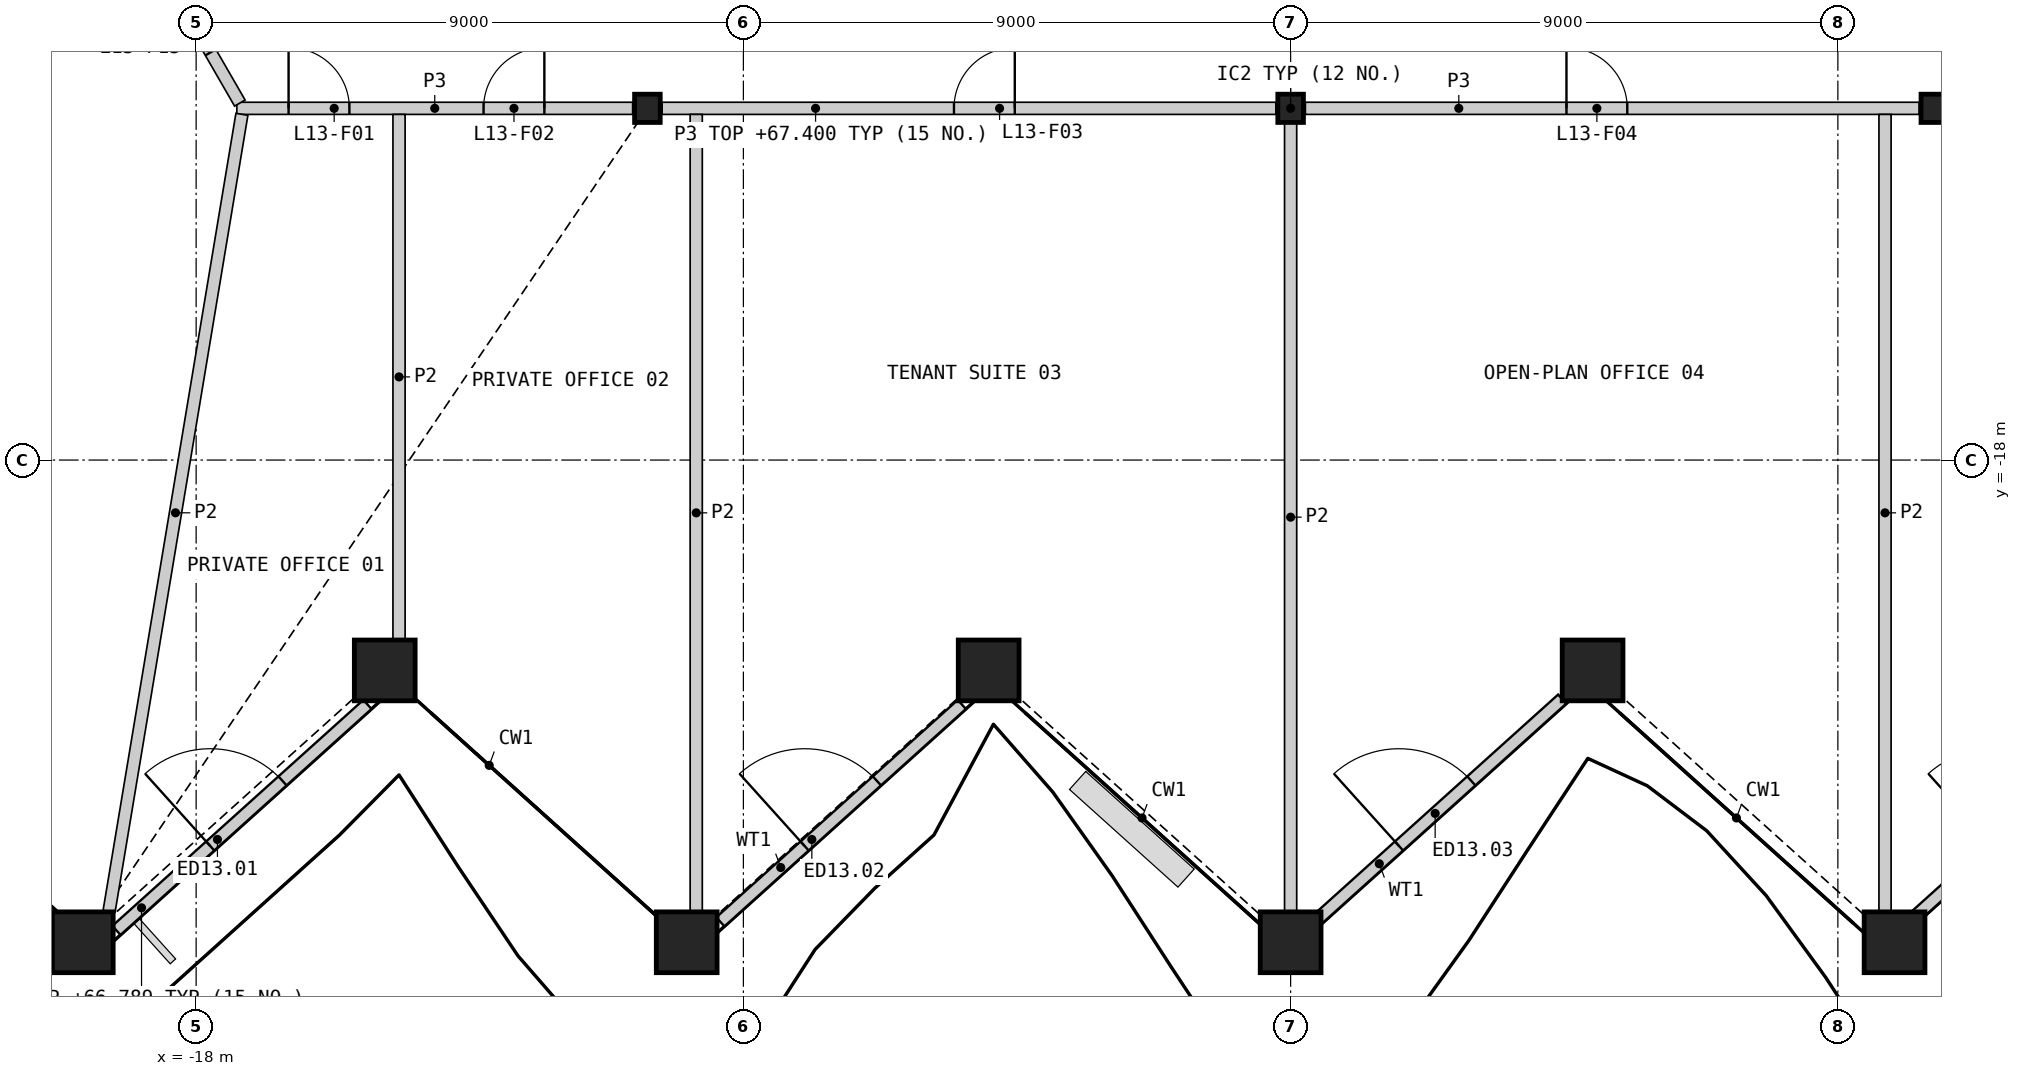
"""IFC4 building model, lengths in metres.
Left out: names, types, materials, properties, quantities, classifications, styles, units other than length and angle.
Written with IfcOpenShell. Run it as: python <this file> out.ifc"""

import sys

from ifc_helpers import new_model, si_unit, direction, frame, frame_2d, origin, origin_2d, place, context, subcontext, project, spatial, rectangle, hollow_rectangle, i_section, extrude, element, fill, save


model = new_model("IFC4")
c1 = context("Model", 3, precision=1e-05, world=origin(), true_north=direction((0.0, 1.0)))
c2 = subcontext(c1, "Body", "Model", "MODEL_VIEW")
j1 = project(units=[si_unit("LENGTHUNIT", "METRE"), si_unit("PLANEANGLEUNIT", "RADIAN")], contexts=[c1])
p1 = place(None, origin())
s1 = spatial("IfcSite", under=j1, at=p1, CompositionType="ELEMENT")
p2 = place(p1, origin())
s2 = spatial("IfcBuilding", under=s1, at=p2, CompositionType="ELEMENT")
p3 = place(p2, frame((0.0, 0.0, 63.6)))
s3 = spatial("IfcBuildingStorey", under=s2, at=p3, CompositionType="ELEMENT", Elevation=63.6)
for number, where, z_axis, x_axis in (
    (1, (-19.864, -25.931, 0.0), (0.0, 0.0, 1.0), (1.0, 0.0, 0.0)),
    (2, (-14.898, -21.46, 0.0), (0.0, 0.0, 1.0), (1.0, 0.0, 0.0)),
    (3, (-9.932, -25.931, 0.0), (0.0, 0.0, 1.0), (1.0, 0.0, 0.0)),
    (4, (-4.966, -21.46, 0.0), (0.0, 0.0, 1.0), (1.0, 0.0, 0.0)),
    (5, (0.0, -25.931, 0.0), (0.0, 0.0, 1.0), (1.0, 0.0, 0.0)),
    (6, (4.966, -21.46, 0.0), (0.0, 0.0, 1.0), (1.0, 0.0, 0.0)),
    (7, (9.932, -25.931, 0.0), (0.0, 0.0, 1.0), (1.0, 0.0, 0.0)),
):
    element("IfcColumn", number, at=place(p3, frame(where, z_axis=z_axis, x_axis=x_axis)), inside=s3, PredefinedType="COLUMN", context=c2, shape_type="SweptSolid", body=[
        extrude(hollow_rectangle(XDim=1.0, YDim=1.0, WallThickness=0.07, at=origin_2d()), origin(), (0.0, 0.0, 1.0), 4.2),
    ])
for number, where, z_axis, x_axis in (
    (8, (-10.578, -12.215, 0.0), (0.0, 0.0, 1.0), (1.0, 0.0, 0.0)),
    (9, (0.0, -12.215, 0.0), (0.0, 0.0, 1.0), (1.0, 0.0, 0.0)),
    (10, (10.578, -12.215, 0.0), (0.0, 0.0, 1.0), (1.0, 0.0, 0.0)),
):
    element("IfcColumn", number, at=place(p3, frame(where, z_axis=z_axis, x_axis=x_axis)), inside=s3, PredefinedType="COLUMN", context=c2, shape_type="SweptSolid", body=[
        extrude(i_section(OverallWidth=0.421, OverallDepth=0.465, WebThickness=0.045, FlangeThickness=0.072, at=origin_2d()), origin(), (0.0, 0.0, 1.0), 4.2),
    ])
p4 = place(p3, frame((-19.311, -25.736, 0.0), z_axis=(0.0, 0.0, 1.0), x_axis=(0.743147692621, 0.66912742206, 0.0)))
e11 = element("IfcWall", 11, at=p4, inside=s3, PredefinedType="SOLIDWALL", context=c2, shape_type="SweptSolid", body=[
    extrude(rectangle(XDim=5.554, YDim=0.2, at=frame_2d((2.777, 0.0))), origin(), (0.0, 0.0, 1.0), 3.189),
])
p5 = place(p4, frame((2.075, 0.0, 0.0)))
e12 = element("IfcOpeningElement", 12, at=p5, cuts=e11, PredefinedType="OPENING", context=c2, shape_type="SweptSolid", body=[
    extrude(rectangle(XDim=1.6, YDim=2.4, at=frame_2d((0.8, 1.2))), frame((0.0, 0.11, 0.0), z_axis=(0.0, -1.0, 0.0), x_axis=(1.0, 0.0, 0.0)), (0.0, 0.0, 1.0), 0.22),
])
p6 = place(p3, frame((-9.379, -25.595, 0.0), z_axis=(0.0, 0.0, 1.0), x_axis=(0.743144193556, 0.669131308178, 0.0)))
e13 = element("IfcWall", 13, at=p6, inside=s3, PredefinedType="SOLIDWALL", context=c2, shape_type="SweptSolid", body=[
    extrude(rectangle(XDim=5.344, YDim=0.2, at=frame_2d((2.672, 0.0))), origin(), (0.0, 0.0, 1.0), 3.189),
])
p7 = place(p6, frame((1.865, 0.0, 0.0)))
e14 = element("IfcOpeningElement", 14, at=p7, cuts=e13, PredefinedType="OPENING", context=c2, shape_type="SweptSolid", body=[
    extrude(rectangle(XDim=1.6, YDim=2.4, at=frame_2d((0.8, 1.2))), frame((0.0, 0.11, 0.0), z_axis=(0.0, -1.0, 0.0), x_axis=(1.0, 0.0, 0.0)), (0.0, 0.0, 1.0), 0.22),
])
p8 = place(p3, frame((0.456, -25.542, 0.0), z_axis=(0.0, 0.0, 1.0), x_axis=(0.743143413551, 0.669132174459, 0.0)))
e15 = element("IfcWall", 15, at=p8, inside=s3, PredefinedType="SOLIDWALL", context=c2, shape_type="SweptSolid", body=[
    extrude(rectangle(XDim=5.397, YDim=0.2, at=frame_2d((2.698, 0.0))), origin(), (0.0, 0.0, 1.0), 3.189),
])
p9 = place(p8, frame((1.786, 0.0, 0.0)))
e16 = element("IfcOpeningElement", 16, at=p9, cuts=e15, PredefinedType="OPENING", context=c2, shape_type="SweptSolid", body=[
    extrude(rectangle(XDim=1.6, YDim=2.4, at=frame_2d((0.8, 1.2))), frame((0.0, 0.11, 0.0), z_axis=(0.0, -1.0, 0.0), x_axis=(1.0, 0.0, 0.0)), (0.0, 0.0, 1.0), 0.22),
])
p10 = place(p3, frame((10.231, -25.542, 0.0), z_axis=(0.0, 0.0, 1.0), x_axis=(0.743162549077, 0.669110921783, 0.0)))
e17 = element("IfcWall", 17, at=p10, inside=s3, PredefinedType="SOLIDWALL", context=c2, shape_type="SweptSolid", body=[
    extrude(rectangle(XDim=5.535, YDim=0.2, at=frame_2d((2.768, 0.0))), origin(), (0.0, 0.0, 1.0), 3.189),
])
p11 = place(p10, frame((1.786, 0.0, 0.0)))
e18 = element("IfcOpeningElement", 18, at=p11, cuts=e17, PredefinedType="OPENING", context=c2, shape_type="SweptSolid", body=[
    extrude(rectangle(XDim=1.6, YDim=2.4, at=frame_2d((0.8, 1.2))), frame((0.0, 0.11, 0.0), z_axis=(0.0, -1.0, 0.0), x_axis=(1.0, 0.0, 0.0)), (0.0, 0.0, 1.0), 0.22),
])
p12 = place(p3, frame((-10.336, -12.215, 0.0), z_axis=(0.0, 0.0, 1.0), x_axis=(1.0, 0.0, 0.0)))
e19 = element("IfcWall", 19, at=p12, inside=s3, PredefinedType="PARTITIONING", context=c2, shape_type="SweptSolid", body=[
    extrude(rectangle(XDim=10.094, YDim=0.2, at=frame_2d((5.047, 0.0))), origin(), (0.0, 0.0, 1.0), 3.8),
])
p13 = place(p12, frame((4.8, 0.0, 0.0)))
e20 = element("IfcOpeningElement", 20, at=p13, cuts=e19, PredefinedType="OPENING", context=c2, shape_type="SweptSolid", body=[
    extrude(rectangle(XDim=1.0, YDim=2.1, at=frame_2d((0.5, 1.05))), frame((0.0, 0.11, 0.0), z_axis=(0.0, -1.0, 0.0), x_axis=(1.0, 0.0, 0.0)), (0.0, 0.0, 1.0), 0.22),
])
p14 = place(p3, frame((0.242, -12.215, 0.0), z_axis=(0.0, 0.0, 1.0), x_axis=(1.0, 0.0, 0.0)))
e21 = element("IfcWall", 21, at=p14, inside=s3, PredefinedType="PARTITIONING", context=c2, shape_type="SweptSolid", body=[
    extrude(rectangle(XDim=10.094, YDim=0.2, at=frame_2d((5.047, 0.0))), origin(), (0.0, 0.0, 1.0), 3.8),
])
p15 = place(p14, frame((4.294, 0.0, 0.0)))
e22 = element("IfcOpeningElement", 22, at=p15, cuts=e21, PredefinedType="OPENING", context=c2, shape_type="SweptSolid", body=[
    extrude(rectangle(XDim=1.0, YDim=2.1, at=frame_2d((0.5, 1.05))), frame((0.0, 0.11, 0.0), z_axis=(0.0, -1.0, 0.0), x_axis=(1.0, 0.0, 0.0)), (0.0, 0.0, 1.0), 0.22),
])
p16 = place(p3, frame((-17.331, -12.215, 0.0), z_axis=(0.0, 0.0, 1.0), x_axis=(1.0, 0.0, 0.0)))
e23 = element("IfcWall", 23, at=p16, inside=s3, PredefinedType="PARTITIONING", context=c2, shape_type="SweptSolid", body=[
    extrude(rectangle(XDim=6.51, YDim=0.2, at=frame_2d((3.255, 0.0))), origin(), (0.0, 0.0, 1.0), 3.8),
])
p17 = place(p16, frame((0.851, 0.0, 0.0)))
e24 = element("IfcOpeningElement", 24, at=p17, cuts=e23, PredefinedType="OPENING", context=c2, shape_type="SweptSolid", body=[
    extrude(rectangle(XDim=1.0, YDim=2.1, at=frame_2d((0.5, 1.05))), frame((0.0, 0.11, 0.0), z_axis=(0.0, -1.0, 0.0), x_axis=(1.0, 0.0, 0.0)), (0.0, 0.0, 1.0), 0.22),
])
p18 = place(p16, frame((4.058, 0.0, 0.0)))
e25 = element("IfcOpeningElement", 25, at=p18, cuts=e23, PredefinedType="OPENING", context=c2, shape_type="SweptSolid", body=[
    extrude(rectangle(XDim=1.0, YDim=2.1, at=frame_2d((0.5, 1.05))), frame((0.0, 0.11, 0.0), z_axis=(0.0, -1.0, 0.0), x_axis=(1.0, 0.0, 0.0)), (0.0, 0.0, 1.0), 0.22),
])
p19 = place(p3, frame((-19.144, -8.902, 0.0), z_axis=(0.0, 0.0, 1.0), x_axis=(0.499958791762, -0.866049194065, 0.0)))
e26 = element("IfcWall", 26, at=p19, inside=s3, PredefinedType="PARTITIONING", context=c2, shape_type="SweptSolid", body=[
    extrude(rectangle(XDim=3.726, YDim=0.2, at=frame_2d((1.863, 0.0))), origin(), (0.0, 0.0, 1.0), 3.8),
])
p20 = place(p19, frame((0.963, 0.0, 0.0)))
e27 = element("IfcOpeningElement", 27, at=p20, cuts=e26, PredefinedType="OPENING", context=c2, shape_type="SweptSolid", body=[
    extrude(rectangle(XDim=1.8, YDim=2.1, at=frame_2d((0.9, 1.05))), frame((0.0, 0.11, 0.0), z_axis=(0.0, -1.0, 0.0), x_axis=(1.0, 0.0, 0.0)), (0.0, 0.0, 1.0), 0.22),
])
p21 = place(p3, frame((-19.432, -25.421, 0.0), z_axis=(0.0, 0.0, 1.0), x_axis=(0.164396008001, 0.986394420378, 0.0)))
e28 = element("IfcWall", 28, at=p21, inside=s3, PredefinedType="PARTITIONING", context=c2, shape_type="SweptSolid", body=[
    extrude(rectangle(XDim=13.289, YDim=0.2, at=frame_2d((6.644, 0.0))), origin(), (0.0, 0.0, 1.0), 2.885),
])
for number, where, z_axis, x_axis in (
    (29, (-9.775, -25.421, 0.0), (0.0, 0.0, 1.0), (0.0, 1.0, 0.0)),
    (30, (9.775, -25.421, 0.0), (0.0, 0.0, 1.0), (0.0, 1.0, 0.0)),
):
    element("IfcWall", number, at=place(p3, frame(where, z_axis=z_axis, x_axis=x_axis)), inside=s3, PredefinedType="PARTITIONING", context=c2, shape_type="SweptSolid", body=[
        extrude(rectangle(XDim=13.106, YDim=0.2, at=frame_2d((6.553, 0.0))), origin(), (0.0, 0.0, 1.0), 2.885),
    ])
p22 = place(p3, frame((0.0, -25.421, 0.0), z_axis=(0.0, 0.0, 1.0), x_axis=(0.0, 1.0, 0.0)))
e31 = element("IfcWall", 31, at=p22, inside=s3, PredefinedType="PARTITIONING", context=c2, shape_type="SweptSolid", body=[
    extrude(rectangle(XDim=12.964, YDim=0.2, at=frame_2d((6.482, 0.0))), origin(), (0.0, 0.0, 1.0), 2.885),
])
p23 = place(p3, frame((-14.663, -20.95, 0.0), z_axis=(0.0, 0.0, 1.0), x_axis=(0.0, 1.0, 0.0)))
e32 = element("IfcWall", 32, at=p23, inside=s3, PredefinedType="PARTITIONING", context=c2, shape_type="SweptSolid", body=[
    extrude(rectangle(XDim=8.635, YDim=0.2, at=frame_2d((4.317, 0.0))), origin(), (0.0, 0.0, 1.0), 2.885),
])
p24 = place(p5, origin())
e33 = element("IfcDoor", 33, at=p24, inside=s3, OperationType="DOUBLE_DOOR_SINGLE_SWING", PredefinedType="DOOR", context=c2, shape_type="SweptSolid", body=[
    extrude(rectangle(XDim=1.6, YDim=2.4, at=frame_2d((0.8, 1.2))), frame((0.0, 0.025, 0.0), z_axis=(0.0, -1.0, 0.0), x_axis=(1.0, 0.0, 0.0)), (0.0, 0.0, 1.0), 0.05),
])
fill(e12, e33)
p25 = place(p7, origin())
e34 = element("IfcDoor", 34, at=p25, inside=s3, OperationType="DOUBLE_DOOR_SINGLE_SWING", PredefinedType="DOOR", context=c2, shape_type="SweptSolid", body=[
    extrude(rectangle(XDim=1.6, YDim=2.4, at=frame_2d((0.8, 1.2))), frame((0.0, 0.025, 0.0), z_axis=(0.0, -1.0, 0.0), x_axis=(1.0, 0.0, 0.0)), (0.0, 0.0, 1.0), 0.05),
])
fill(e14, e34)
p26 = place(p9, origin())
e35 = element("IfcDoor", 35, at=p26, inside=s3, OperationType="DOUBLE_DOOR_SINGLE_SWING", PredefinedType="DOOR", context=c2, shape_type="SweptSolid", body=[
    extrude(rectangle(XDim=1.6, YDim=2.4, at=frame_2d((0.8, 1.2))), frame((0.0, 0.025, 0.0), z_axis=(0.0, -1.0, 0.0), x_axis=(1.0, 0.0, 0.0)), (0.0, 0.0, 1.0), 0.05),
])
fill(e16, e35)
p27 = place(p17, origin())
e36 = element("IfcDoor", 36, at=p27, inside=s3, OperationType="SINGLE_SWING_LEFT", PredefinedType="DOOR", context=c2, shape_type="SweptSolid", body=[
    extrude(rectangle(XDim=1.0, YDim=2.1, at=frame_2d((0.5, 1.05))), frame((0.0, 0.025, 0.0), z_axis=(0.0, -1.0, 0.0), x_axis=(1.0, 0.0, 0.0)), (0.0, 0.0, 1.0), 0.05),
])
fill(e24, e36)
p28 = place(p18, origin())
e37 = element("IfcDoor", 37, at=p28, inside=s3, OperationType="SINGLE_SWING_RIGHT", PredefinedType="DOOR", context=c2, shape_type="SweptSolid", body=[
    extrude(rectangle(XDim=1.0, YDim=2.1, at=frame_2d((0.5, 1.05))), frame((0.0, 0.025, 0.0), z_axis=(0.0, -1.0, 0.0), x_axis=(1.0, 0.0, 0.0)), (0.0, 0.0, 1.0), 0.05),
])
fill(e25, e37)
p29 = place(p13, origin())
e38 = element("IfcDoor", 38, at=p29, inside=s3, OperationType="SINGLE_SWING_RIGHT", PredefinedType="DOOR", context=c2, shape_type="SweptSolid", body=[
    extrude(rectangle(XDim=1.0, YDim=2.1, at=frame_2d((0.5, 1.05))), frame((0.0, 0.025, 0.0), z_axis=(0.0, -1.0, 0.0), x_axis=(1.0, 0.0, 0.0)), (0.0, 0.0, 1.0), 0.05),
])
fill(e20, e38)
p30 = place(p15, origin())
e39 = element("IfcDoor", 39, at=p30, inside=s3, OperationType="SINGLE_SWING_LEFT", PredefinedType="DOOR", context=c2, shape_type="SweptSolid", body=[
    extrude(rectangle(XDim=1.0, YDim=2.1, at=frame_2d((0.5, 1.05))), frame((0.0, 0.025, 0.0), z_axis=(0.0, -1.0, 0.0), x_axis=(1.0, 0.0, 0.0)), (0.0, 0.0, 1.0), 0.05),
])
fill(e22, e39)
p31 = place(p20, origin())
e40 = element("IfcDoor", 40, at=p31, inside=s3, OperationType="DOUBLE_DOOR_SINGLE_SWING", PredefinedType="DOOR", context=c2, shape_type="SweptSolid", body=[
    extrude(rectangle(XDim=1.8, YDim=2.1, at=frame_2d((0.9, 1.05))), frame((0.0, 0.025, 0.0), z_axis=(0.0, -1.0, 0.0), x_axis=(1.0, 0.0, 0.0)), (0.0, 0.0, 1.0), 0.05),
])
fill(e27, e40)
save(model, sys.argv[1])
